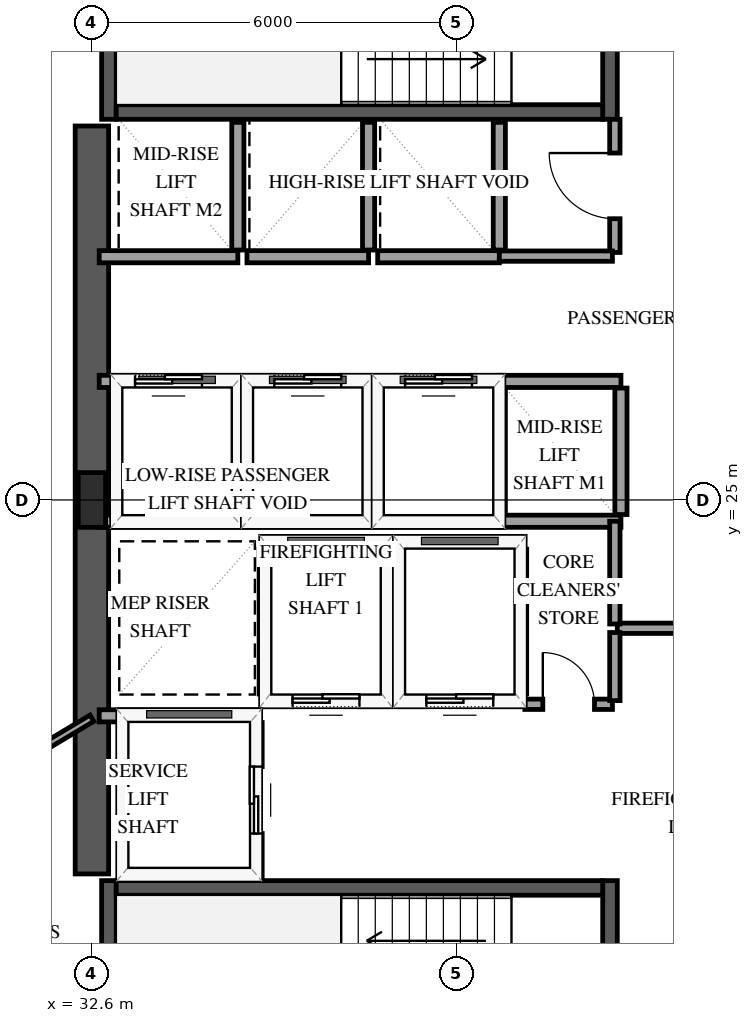
"""IFC4 building model, lengths in metres.
Left out: names, types, materials, properties, quantities, classifications, styles, units other than length and angle.
Written with IfcOpenShell. Run it as: python <this file> out.ifc"""

import sys

from ifc_helpers import new_model, si_unit, direction, frame, frame_2d, origin, origin_2d, place, context, subcontext, project, spatial, rectangle, extrude, element, fill, save


model = new_model("IFC4")
c1 = context("Model", 3, precision=1e-05, world=origin(), true_north=direction((0.0, 1.0)))
c2 = subcontext(c1, "Body", "Model", "MODEL_VIEW")
j1 = project(units=[si_unit("LENGTHUNIT", "METRE"), si_unit("PLANEANGLEUNIT", "RADIAN")], contexts=[c1])
p1 = place(None, origin())
s1 = spatial("IfcSite", under=j1, at=p1, CompositionType="ELEMENT")
p2 = place(p1, origin())
s2 = spatial("IfcBuilding", under=s1, at=p2, CompositionType="ELEMENT")
p3 = place(p2, frame((0.0, 0.0, 103.0)))
s3 = spatial("IfcBuildingStorey", under=s2, at=p3, CompositionType="ELEMENT", Elevation=103.0)
p4 = place(p3, frame((32.88, 15.11, 0.0), z_axis=(0.0, 0.0, 1.0), x_axis=(0.0, 1.0, 0.0)))
e1 = element("IfcWall", 1, at=p4, inside=s3, PredefinedType="SHEAR", context=c2, shape_type="SweptSolid", body=[
    extrude(rectangle(XDim=3.63, YDim=0.24, at=frame_2d((1.815, 0.0))), origin(), (0.0, 0.0, 1.0), 3.9),
])
p5 = place(p3, frame((41.12, 15.11, 0.0), z_axis=(0.0, 0.0, 1.0), x_axis=(0.0, 1.0, 0.0)))
e2 = element("IfcWall", 2, at=p5, inside=s3, PredefinedType="SHEAR", context=c2, shape_type="SweptSolid", body=[
    extrude(rectangle(XDim=3.63, YDim=0.24, at=frame_2d((1.815, 0.0))), origin(), (0.0, 0.0, 1.0), 3.9),
])
p6 = place(p5, frame((1.255, 0.0, 0.0)))
e3 = element("IfcOpeningElement", 3, at=p6, cuts=e2, PredefinedType="OPENING", context=c2, shape_type="SweptSolid", body=[
    extrude(rectangle(XDim=1.12, YDim=2.15, at=frame_2d((0.56, 1.075))), frame((0.0, 0.13, 0.0), z_axis=(0.0, -1.0, 0.0), x_axis=(1.0, 0.0, 0.0)), (0.0, 0.0, 1.0), 0.26),
])
p7 = place(p3, frame((33.0, 18.62, 0.0), z_axis=(0.0, 0.0, 1.0), x_axis=(1.0, 0.0, 0.0)))
e4 = element("IfcWall", 4, at=p7, inside=s3, PredefinedType="SHEAR", context=c2, shape_type="SweptSolid", body=[
    extrude(rectangle(XDim=8.0, YDim=0.24, at=frame_2d((4.0, 0.0))), origin(), (0.0, 0.0, 1.0), 3.9),
])
p8 = place(p3, frame((32.88, 31.26, 0.0), z_axis=(0.0, 0.0, 1.0), x_axis=(0.0, 1.0, 0.0)))
e5 = element("IfcWall", 5, at=p8, inside=s3, PredefinedType="SHEAR", context=c2, shape_type="SweptSolid", body=[
    extrude(rectangle(XDim=3.63, YDim=0.24, at=frame_2d((1.815, 0.0))), origin(), (0.0, 0.0, 1.0), 3.9),
])
p9 = place(p3, frame((41.12, 31.26, 0.0), z_axis=(0.0, 0.0, 1.0), x_axis=(0.0, 1.0, 0.0)))
e6 = element("IfcWall", 6, at=p9, inside=s3, PredefinedType="SHEAR", context=c2, shape_type="SweptSolid", body=[
    extrude(rectangle(XDim=3.63, YDim=0.24, at=frame_2d((1.815, 0.0))), origin(), (0.0, 0.0, 1.0), 3.9),
])
p10 = place(p9, frame((1.255, 0.0, 0.0)))
e7 = element("IfcOpeningElement", 7, at=p10, cuts=e6, PredefinedType="OPENING", context=c2, shape_type="SweptSolid", body=[
    extrude(rectangle(XDim=1.12, YDim=2.15, at=frame_2d((0.56, 1.075))), frame((0.0, 0.13, 0.0), z_axis=(0.0, -1.0, 0.0), x_axis=(1.0, 0.0, 0.0)), (0.0, 0.0, 1.0), 0.26),
])
p11 = place(p3, frame((33.0, 31.38, 0.0), z_axis=(0.0, 0.0, 1.0), x_axis=(1.0, 0.0, 0.0)))
e8 = element("IfcWall", 8, at=p11, inside=s3, PredefinedType="SHEAR", context=c2, shape_type="SweptSolid", body=[
    extrude(rectangle(XDim=8.0, YDim=0.24, at=frame_2d((4.0, 0.0))), origin(), (0.0, 0.0, 1.0), 3.9),
])
p12 = place(p3, frame((32.6, 18.85, 0.0), z_axis=(0.0, 0.0, 1.0), x_axis=(0.0, 1.0, 0.0)))
e9 = element("IfcWall", 9, at=p12, inside=s3, PredefinedType="SHEAR", context=c2, shape_type="SweptSolid", body=[
    extrude(rectangle(XDim=12.3, YDim=0.55, at=frame_2d((6.15, 0.0))), origin(), (0.0, 0.0, 1.0), 3.9),
])
p13 = place(p3, frame((32.6, 25.0, 0.0), z_axis=(0.0, 0.0, 1.0), x_axis=(1.0, 0.0, 0.0)))
e10 = element("IfcColumn", 10, at=p13, inside=s3, PredefinedType="PILASTER", context=c2, shape_type="SweptSolid", body=[
    extrude(rectangle(XDim=0.45, YDim=0.9, at=origin_2d()), origin(), (0.0, 0.0, 1.0), 3.9),
])
p14 = place(p3, frame((35.45, 21.7, 0.0), z_axis=(0.0, 0.0, 1.0), x_axis=(1.0, 0.0, 0.0)))
e11 = element("IfcWall", 11, at=p14, inside=s3, PredefinedType="SOLIDWALL", context=c2, shape_type="SweptSolid", body=[
    extrude(rectangle(XDim=2.0, YDim=0.2, at=frame_2d((1.0, 0.0))), origin(), (0.0, 0.0, 1.0), 3.6),
])
p15 = place(p14, frame((0.45, 0.0, 0.0)))
e12 = element("IfcOpeningElement", 12, at=p15, cuts=e11, PredefinedType="OPENING", context=c2, shape_type="SweptSolid", body=[
    extrude(rectangle(XDim=1.1, YDim=2.15, at=frame_2d((0.55, 1.075))), frame((0.0, 0.11, 0.0), z_axis=(0.0, -1.0, 0.0), x_axis=(1.0, 0.0, 0.0)), (0.0, 0.0, 1.0), 0.22),
])
p16 = place(p3, frame((35.45, 24.3, 0.0), z_axis=(0.0, 0.0, 1.0), x_axis=(1.0, 0.0, 0.0)))
e13 = element("IfcWall", 13, at=p16, inside=s3, PredefinedType="SOLIDWALL", context=c2, shape_type="SweptSolid", body=[
    extrude(rectangle(XDim=2.0, YDim=0.2, at=frame_2d((1.0, 0.0))), origin(), (0.0, 0.0, 1.0), 3.6),
])
for number, where, z_axis, x_axis in (
    (14, (35.45, 21.81, 0.0), (0.0, 0.0, 1.0), (0.0, 1.0, 0.0)),
    (15, (37.45, 21.81, 0.0), (0.0, 0.0, 1.0), (0.0, 1.0, 0.0)),
):
    element("IfcWall", number, at=place(p3, frame(where, z_axis=z_axis, x_axis=x_axis)), inside=s3, PredefinedType="SOLIDWALL", context=c2, shape_type="SweptSolid", body=[
        extrude(rectangle(XDim=2.38, YDim=0.2, at=frame_2d((1.19, 0.0))), origin(), (0.0, 0.0, 1.0), 3.6),
    ])
p17 = place(p3, frame((37.65, 21.7, 0.0), z_axis=(0.0, 0.0, 1.0), x_axis=(1.0, 0.0, 0.0)))
e16 = element("IfcWall", 16, at=p17, inside=s3, PredefinedType="SOLIDWALL", context=c2, shape_type="SweptSolid", body=[
    extrude(rectangle(XDim=2.0, YDim=0.2, at=frame_2d((1.0, 0.0))), origin(), (0.0, 0.0, 1.0), 3.6),
])
p18 = place(p17, frame((0.45, 0.0, 0.0)))
e17 = element("IfcOpeningElement", 17, at=p18, cuts=e16, PredefinedType="OPENING", context=c2, shape_type="SweptSolid", body=[
    extrude(rectangle(XDim=1.1, YDim=2.15, at=frame_2d((0.55, 1.075))), frame((0.0, 0.11, 0.0), z_axis=(0.0, -1.0, 0.0), x_axis=(1.0, 0.0, 0.0)), (0.0, 0.0, 1.0), 0.22),
])
p19 = place(p3, frame((37.65, 24.3, 0.0), z_axis=(0.0, 0.0, 1.0), x_axis=(1.0, 0.0, 0.0)))
e18 = element("IfcWall", 18, at=p19, inside=s3, PredefinedType="SOLIDWALL", context=c2, shape_type="SweptSolid", body=[
    extrude(rectangle(XDim=2.0, YDim=0.2, at=frame_2d((1.0, 0.0))), origin(), (0.0, 0.0, 1.0), 3.6),
])
p20 = place(p3, frame((39.65, 21.81, 0.0), z_axis=(0.0, 0.0, 1.0), x_axis=(0.0, 1.0, 0.0)))
e19 = element("IfcWall", 19, at=p20, inside=s3, PredefinedType="SOLIDWALL", context=c2, shape_type="SweptSolid", body=[
    extrude(rectangle(XDim=2.38, YDim=0.2, at=frame_2d((1.19, 0.0))), origin(), (0.0, 0.0, 1.0), 3.6),
])
p21 = place(p3, frame((32.72, 21.45, 0.0), z_axis=(0.0, 0.0, 1.0), x_axis=(1.0, 0.0, 0.0)))
e20 = element("IfcWall", 20, at=p21, inside=s3, PredefinedType="SOLIDWALL", context=c2, shape_type="SweptSolid", body=[
    extrude(rectangle(XDim=2.58, YDim=0.2, at=frame_2d((1.29, 0.0))), origin(), (0.0, 0.0, 1.0), 3.6),
])
p22 = place(p3, frame((35.3, 18.79, 0.0), z_axis=(0.0, 0.0, 1.0), x_axis=(0.0, 1.0, 0.0)))
e21 = element("IfcWall", 21, at=p22, inside=s3, PredefinedType="SOLIDWALL", context=c2, shape_type="SweptSolid", body=[
    extrude(rectangle(XDim=2.55, YDim=0.2, at=frame_2d((1.275, 0.0))), origin(), (0.0, 0.0, 1.0), 3.6),
])
p23 = place(p22, frame((0.725, 0.0, 0.0)))
e22 = element("IfcOpeningElement", 22, at=p23, cuts=e21, PredefinedType="OPENING", context=c2, shape_type="SweptSolid", body=[
    extrude(rectangle(XDim=1.1, YDim=2.15, at=frame_2d((0.55, 1.075))), frame((0.0, 0.11, 0.0), z_axis=(0.0, -1.0, 0.0), x_axis=(1.0, 0.0, 0.0)), (0.0, 0.0, 1.0), 0.22),
])
p24 = place(p3, frame((32.72, 24.65, 0.0), z_axis=(0.0, 0.0, 1.0), x_axis=(1.0, 0.0, 0.0)))
e23 = element("IfcWall", 23, at=p24, inside=s3, PredefinedType="SOLIDWALL", context=c2, shape_type="SweptSolid", body=[
    extrude(rectangle(XDim=2.28, YDim=0.2, at=frame_2d((1.14, 0.0))), origin(), (0.0, 0.0, 1.0), 3.6),
])
p25 = place(p3, frame((32.72, 26.95, 0.0), z_axis=(0.0, 0.0, 1.0), x_axis=(1.0, 0.0, 0.0)))
e24 = element("IfcWall", 24, at=p25, inside=s3, PredefinedType="SOLIDWALL", context=c2, shape_type="SweptSolid", body=[
    extrude(rectangle(XDim=2.28, YDim=0.2, at=frame_2d((1.14, 0.0))), origin(), (0.0, 0.0, 1.0), 3.6),
])
p26 = place(p25, frame((0.59, 0.0, 0.0)))
e25 = element("IfcOpeningElement", 25, at=p26, cuts=e24, PredefinedType="OPENING", context=c2, shape_type="SweptSolid", body=[
    extrude(rectangle(XDim=1.1, YDim=2.15, at=frame_2d((0.55, 1.075))), frame((0.0, 0.11, 0.0), z_axis=(0.0, -1.0, 0.0), x_axis=(1.0, 0.0, 0.0)), (0.0, 0.0, 1.0), 0.22),
])
p27 = place(p3, frame((35.0, 24.76, 0.0), z_axis=(0.0, 0.0, 1.0), x_axis=(0.0, 1.0, 0.0)))
e26 = element("IfcWall", 26, at=p27, inside=s3, PredefinedType="SOLIDWALL", context=c2, shape_type="SweptSolid", body=[
    extrude(rectangle(XDim=2.08, YDim=0.2, at=frame_2d((1.04, 0.0))), origin(), (0.0, 0.0, 1.0), 3.6),
])
p28 = place(p3, frame((35.15, 24.65, 0.0), z_axis=(0.0, 0.0, 1.0), x_axis=(1.0, 0.0, 0.0)))
e27 = element("IfcWall", 27, at=p28, inside=s3, PredefinedType="SOLIDWALL", context=c2, shape_type="SweptSolid", body=[
    extrude(rectangle(XDim=2.0, YDim=0.2, at=frame_2d((1.0, 0.0))), origin(), (0.0, 0.0, 1.0), 3.6),
])
p29 = place(p3, frame((35.15, 26.95, 0.0), z_axis=(0.0, 0.0, 1.0), x_axis=(1.0, 0.0, 0.0)))
e28 = element("IfcWall", 28, at=p29, inside=s3, PredefinedType="SOLIDWALL", context=c2, shape_type="SweptSolid", body=[
    extrude(rectangle(XDim=2.0, YDim=0.2, at=frame_2d((1.0, 0.0))), origin(), (0.0, 0.0, 1.0), 3.6),
])
p30 = place(p29, frame((0.45, 0.0, 0.0)))
e29 = element("IfcOpeningElement", 29, at=p30, cuts=e28, PredefinedType="OPENING", context=c2, shape_type="SweptSolid", body=[
    extrude(rectangle(XDim=1.1, YDim=2.15, at=frame_2d((0.55, 1.075))), frame((0.0, 0.11, 0.0), z_axis=(0.0, -1.0, 0.0), x_axis=(1.0, 0.0, 0.0)), (0.0, 0.0, 1.0), 0.22),
])
p31 = place(p3, frame((37.15, 24.76, 0.0), z_axis=(0.0, 0.0, 1.0), x_axis=(0.0, 1.0, 0.0)))
e30 = element("IfcWall", 30, at=p31, inside=s3, PredefinedType="SOLIDWALL", context=c2, shape_type="SweptSolid", body=[
    extrude(rectangle(XDim=2.08, YDim=0.2, at=frame_2d((1.04, 0.0))), origin(), (0.0, 0.0, 1.0), 3.6),
])
p32 = place(p3, frame((37.3, 24.65, 0.0), z_axis=(0.0, 0.0, 1.0), x_axis=(1.0, 0.0, 0.0)))
e31 = element("IfcWall", 31, at=p32, inside=s3, PredefinedType="SOLIDWALL", context=c2, shape_type="SweptSolid", body=[
    extrude(rectangle(XDim=2.0, YDim=0.2, at=frame_2d((1.0, 0.0))), origin(), (0.0, 0.0, 1.0), 3.6),
])
p33 = place(p3, frame((37.3, 26.95, 0.0), z_axis=(0.0, 0.0, 1.0), x_axis=(1.0, 0.0, 0.0)))
e32 = element("IfcWall", 32, at=p33, inside=s3, PredefinedType="SOLIDWALL", context=c2, shape_type="SweptSolid", body=[
    extrude(rectangle(XDim=2.0, YDim=0.2, at=frame_2d((1.0, 0.0))), origin(), (0.0, 0.0, 1.0), 3.6),
])
p34 = place(p33, frame((0.45, 0.0, 0.0)))
e33 = element("IfcOpeningElement", 33, at=p34, cuts=e32, PredefinedType="OPENING", context=c2, shape_type="SweptSolid", body=[
    extrude(rectangle(XDim=1.1, YDim=2.15, at=frame_2d((0.55, 1.075))), frame((0.0, 0.11, 0.0), z_axis=(0.0, -1.0, 0.0), x_axis=(1.0, 0.0, 0.0)), (0.0, 0.0, 1.0), 0.22),
])
p35 = place(p3, frame((39.3, 24.76, 0.0), z_axis=(0.0, 0.0, 1.0), x_axis=(0.0, 1.0, 0.0)))
e34 = element("IfcWall", 34, at=p35, inside=s3, PredefinedType="SOLIDWALL", context=c2, shape_type="SweptSolid", body=[
    extrude(rectangle(XDim=2.08, YDim=0.2, at=frame_2d((1.04, 0.0))), origin(), (0.0, 0.0, 1.0), 3.6),
])
for number, where, z_axis, x_axis in (
    (35, (39.3, 24.65, 0.0), (0.0, 0.0, 1.0), (1.0, 0.0, 0.0)),
    (36, (39.3, 26.95, 0.0), (0.0, 0.0, 1.0), (1.0, 0.0, 0.0)),
):
    element("IfcWall", number, at=place(p3, frame(where, z_axis=z_axis, x_axis=x_axis)), inside=s3, PredefinedType="SOLIDWALL", context=c2, shape_type="SweptSolid", body=[
        extrude(rectangle(XDim=2.0, YDim=0.2, at=frame_2d((1.0, 0.0))), origin(), (0.0, 0.0, 1.0), 3.6),
    ])
p36 = place(p3, frame((41.3, 24.76, 0.0), z_axis=(0.0, 0.0, 1.0), x_axis=(0.0, 1.0, 0.0)))
e37 = element("IfcWall", 37, at=p36, inside=s3, PredefinedType="SOLIDWALL", context=c2, shape_type="SweptSolid", body=[
    extrude(rectangle(XDim=2.08, YDim=0.2, at=frame_2d((1.04, 0.0))), origin(), (0.0, 0.0, 1.0), 3.6),
])
p37 = place(p3, frame((32.72, 29.0, 0.0), z_axis=(0.0, 0.0, 1.0), x_axis=(1.0, 0.0, 0.0)))
e38 = element("IfcWall", 38, at=p37, inside=s3, PredefinedType="SOLIDWALL", context=c2, shape_type="SweptSolid", body=[
    extrude(rectangle(XDim=2.28, YDim=0.2, at=frame_2d((1.14, 0.0))), origin(), (0.0, 0.0, 1.0), 3.6),
])
p38 = place(p3, frame((35.0, 29.11, 0.0), z_axis=(0.0, 0.0, 1.0), x_axis=(0.0, 1.0, 0.0)))
e39 = element("IfcWall", 39, at=p38, inside=s3, PredefinedType="SOLIDWALL", context=c2, shape_type="SweptSolid", body=[
    extrude(rectangle(XDim=2.1, YDim=0.2, at=frame_2d((1.05, 0.0))), origin(), (0.0, 0.0, 1.0), 3.6),
])
p39 = place(p3, frame((35.15, 29.0, 0.0), z_axis=(0.0, 0.0, 1.0), x_axis=(1.0, 0.0, 0.0)))
e40 = element("IfcWall", 40, at=p39, inside=s3, PredefinedType="SOLIDWALL", context=c2, shape_type="SweptSolid", body=[
    extrude(rectangle(XDim=2.0, YDim=0.2, at=frame_2d((1.0, 0.0))), origin(), (0.0, 0.0, 1.0), 3.6),
])
p40 = place(p3, frame((37.15, 29.11, 0.0), z_axis=(0.0, 0.0, 1.0), x_axis=(0.0, 1.0, 0.0)))
e41 = element("IfcWall", 41, at=p40, inside=s3, PredefinedType="SOLIDWALL", context=c2, shape_type="SweptSolid", body=[
    extrude(rectangle(XDim=2.1, YDim=0.2, at=frame_2d((1.05, 0.0))), origin(), (0.0, 0.0, 1.0), 3.6),
])
p41 = place(p3, frame((37.3, 29.0, 0.0), z_axis=(0.0, 0.0, 1.0), x_axis=(1.0, 0.0, 0.0)))
e42 = element("IfcWall", 42, at=p41, inside=s3, PredefinedType="SOLIDWALL", context=c2, shape_type="SweptSolid", body=[
    extrude(rectangle(XDim=2.0, YDim=0.2, at=frame_2d((1.0, 0.0))), origin(), (0.0, 0.0, 1.0), 3.6),
])
p42 = place(p3, frame((39.3, 29.11, 0.0), z_axis=(0.0, 0.0, 1.0), x_axis=(0.0, 1.0, 0.0)))
e43 = element("IfcWall", 43, at=p42, inside=s3, PredefinedType="SOLIDWALL", context=c2, shape_type="SweptSolid", body=[
    extrude(rectangle(XDim=2.1, YDim=0.2, at=frame_2d((1.05, 0.0))), origin(), (0.0, 0.0, 1.0), 3.6),
])
p43 = place(p3, frame((32.6, 21.411, 0.0), z_axis=(0.0, 0.0, 1.0), x_axis=(-0.85825649037, -0.513221001848, 0.0)))
e44 = element("IfcWall", 44, at=p43, inside=s3, PredefinedType="PARTITIONING", context=c2, shape_type="SweptSolid", body=[
    extrude(rectangle(XDim=6.171, YDim=0.12, at=frame_2d((3.085, 0.0))), origin(), (0.0, 0.0, 1.0), 3.6),
])
p44 = place(p3, frame((41.24, 22.89, 0.0), z_axis=(0.0, 0.0, 1.0), x_axis=(1.0, 0.0, 0.0)))
e45 = element("IfcWall", 45, at=p44, inside=s3, PredefinedType="PARTITIONING", context=c2, shape_type="SweptSolid", body=[
    extrude(rectangle(XDim=3.32, YDim=0.17, at=frame_2d((1.66, 0.0))), origin(), (0.0, 0.0, 1.0), 3.6),
])
p45 = place(p44, frame((1.12, 0.0, 0.0)))
e46 = element("IfcOpeningElement", 46, at=p45, cuts=e45, PredefinedType="OPENING", context=c2, shape_type="SweptSolid", body=[
    extrude(rectangle(XDim=1.08, YDim=2.15, at=frame_2d((0.54, 1.075))), frame((0.0, 0.095, 0.0), z_axis=(0.0, -1.0, 0.0), x_axis=(1.0, 0.0, 0.0)), (0.0, 0.0, 1.0), 0.19),
])
p46 = place(p3, frame((41.2, 29.07, 0.0), z_axis=(0.0, 0.0, 1.0), x_axis=(0.0, 1.0, 0.0)))
e47 = element("IfcWall", 47, at=p46, inside=s3, PredefinedType="PARTITIONING", context=c2, shape_type="SweptSolid", body=[
    extrude(rectangle(XDim=2.19, YDim=0.17, at=frame_2d((1.095, 0.0))), origin(), (0.0, 0.0, 1.0), 3.6),
])
p47 = place(p46, frame((0.555, 0.0, 0.0)))
e48 = element("IfcOpeningElement", 48, at=p47, cuts=e47, PredefinedType="OPENING", context=c2, shape_type="SweptSolid", body=[
    extrude(rectangle(XDim=1.08, YDim=2.15, at=frame_2d((0.54, 1.075))), frame((0.0, 0.095, 0.0), z_axis=(0.0, -1.0, 0.0), x_axis=(1.0, 0.0, 0.0)), (0.0, 0.0, 1.0), 0.19),
])
p48 = place(p3, frame((39.3, 29.01, 0.0), z_axis=(0.0, 0.0, 1.0), x_axis=(1.0, 0.0, 0.0)))
e49 = element("IfcWall", 49, at=p48, inside=s3, PredefinedType="PARTITIONING", context=c2, shape_type="SweptSolid", body=[
    extrude(rectangle(XDim=1.86, YDim=0.17, at=frame_2d((0.93, 0.0))), origin(), (0.0, 0.0, 1.0), 3.6),
])
p49 = place(p3, frame((41.2, 22.96, 0.0), z_axis=(0.0, 0.0, 1.0), x_axis=(0.0, 1.0, 0.0)))
e50 = element("IfcWall", 50, at=p49, inside=s3, PredefinedType="PARTITIONING", context=c2, shape_type="SweptSolid", body=[
    extrude(rectangle(XDim=1.69, YDim=0.17, at=frame_2d((0.845, 0.0))), origin(), (0.0, 0.0, 1.0), 3.6),
])
p50 = place(p3, frame((39.72, 21.64, 0.0), z_axis=(0.0, 0.0, 1.0), x_axis=(1.0, 0.0, 0.0)))
e51 = element("IfcWall", 51, at=p50, inside=s3, PredefinedType="PARTITIONING", context=c2, shape_type="SweptSolid", body=[
    extrude(rectangle(XDim=1.44, YDim=0.17, at=frame_2d((0.72, 0.0))), origin(), (0.0, 0.0, 1.0), 3.6),
])
p51 = place(p50, frame((0.295, 0.0, 0.0)))
e52 = element("IfcOpeningElement", 52, at=p51, cuts=e51, PredefinedType="OPENING", context=c2, shape_type="SweptSolid", body=[
    extrude(rectangle(XDim=0.85, YDim=2.1, at=frame_2d((0.425, 1.05))), frame((0.0, 0.095, 0.0), z_axis=(0.0, -1.0, 0.0), x_axis=(1.0, 0.0, 0.0)), (0.0, 0.0, 1.0), 0.19),
])
p52 = place(p3, frame((41.2, 21.7, 0.0), z_axis=(0.0, 0.0, 1.0), x_axis=(0.0, 1.0, 0.0)))
e53 = element("IfcWall", 53, at=p52, inside=s3, PredefinedType="PARTITIONING", context=c2, shape_type="SweptSolid", body=[
    extrude(rectangle(XDim=1.12, YDim=0.17, at=frame_2d((0.56, 0.0))), origin(), (0.0, 0.0, 1.0), 3.6),
])
p53 = place(p15, origin())
e54 = element("IfcDoor", 54, at=p53, inside=s3, OperationType="SLIDING_TO_LEFT", PredefinedType="DOOR", context=c2, shape_type="SweptSolid", body=[
    extrude(rectangle(XDim=1.1, YDim=2.15, at=frame_2d((0.55, 1.075))), frame((0.0, 0.025, 0.0), z_axis=(0.0, -1.0, 0.0), x_axis=(1.0, 0.0, 0.0)), (0.0, 0.0, 1.0), 0.05),
])
fill(e12, e54)
p54 = place(p18, origin())
e55 = element("IfcDoor", 55, at=p54, inside=s3, OperationType="SLIDING_TO_LEFT", PredefinedType="DOOR", context=c2, shape_type="SweptSolid", body=[
    extrude(rectangle(XDim=1.1, YDim=2.15, at=frame_2d((0.55, 1.075))), frame((0.0, 0.025, 0.0), z_axis=(0.0, -1.0, 0.0), x_axis=(1.0, 0.0, 0.0)), (0.0, 0.0, 1.0), 0.05),
])
fill(e17, e55)
p55 = place(p23, origin())
e56 = element("IfcDoor", 56, at=p55, inside=s3, OperationType="SLIDING_TO_LEFT", PredefinedType="DOOR", context=c2, shape_type="SweptSolid", body=[
    extrude(rectangle(XDim=1.1, YDim=2.15, at=frame_2d((0.55, 1.075))), frame((0.0, 0.025, 0.0), z_axis=(0.0, -1.0, 0.0), x_axis=(1.0, 0.0, 0.0)), (0.0, 0.0, 1.0), 0.05),
])
fill(e22, e56)
p56 = place(p26, origin())
e57 = element("IfcDoor", 57, at=p56, inside=s3, OperationType="SLIDING_TO_LEFT", PredefinedType="DOOR", context=c2, shape_type="SweptSolid", body=[
    extrude(rectangle(XDim=1.1, YDim=2.15, at=frame_2d((0.55, 1.075))), frame((0.0, 0.025, 0.0), z_axis=(0.0, -1.0, 0.0), x_axis=(1.0, 0.0, 0.0)), (0.0, 0.0, 1.0), 0.05),
])
fill(e25, e57)
p57 = place(p30, origin())
e58 = element("IfcDoor", 58, at=p57, inside=s3, OperationType="SLIDING_TO_LEFT", PredefinedType="DOOR", context=c2, shape_type="SweptSolid", body=[
    extrude(rectangle(XDim=1.1, YDim=2.15, at=frame_2d((0.55, 1.075))), frame((0.0, 0.025, 0.0), z_axis=(0.0, -1.0, 0.0), x_axis=(1.0, 0.0, 0.0)), (0.0, 0.0, 1.0), 0.05),
])
fill(e29, e58)
p58 = place(p34, origin())
e59 = element("IfcDoor", 59, at=p58, inside=s3, OperationType="SLIDING_TO_LEFT", PredefinedType="DOOR", context=c2, shape_type="SweptSolid", body=[
    extrude(rectangle(XDim=1.1, YDim=2.15, at=frame_2d((0.55, 1.075))), frame((0.0, 0.025, 0.0), z_axis=(0.0, -1.0, 0.0), x_axis=(1.0, 0.0, 0.0)), (0.0, 0.0, 1.0), 0.05),
])
fill(e33, e59)
p59 = place(p47, origin())
e60 = element("IfcDoor", 60, at=p59, inside=s3, OperationType="SINGLE_SWING_RIGHT", PredefinedType="DOOR", context=c2, shape_type="SweptSolid", body=[
    extrude(rectangle(XDim=1.08, YDim=2.15, at=frame_2d((0.54, 1.075))), frame((0.0, 0.025, 0.0), z_axis=(0.0, -1.0, 0.0), x_axis=(1.0, 0.0, 0.0)), (0.0, 0.0, 1.0), 0.05),
])
fill(e48, e60)
p60 = place(p51, origin())
e61 = element("IfcDoor", 61, at=p60, inside=s3, OperationType="SINGLE_SWING_LEFT", PredefinedType="DOOR", context=c2, shape_type="SweptSolid", body=[
    extrude(rectangle(XDim=0.85, YDim=2.1, at=frame_2d((0.425, 1.05))), frame((0.0, 0.025, 0.0), z_axis=(0.0, -1.0, 0.0), x_axis=(1.0, 0.0, 0.0)), (0.0, 0.0, 1.0), 0.05),
])
fill(e52, e61)
save(model, sys.argv[1])
